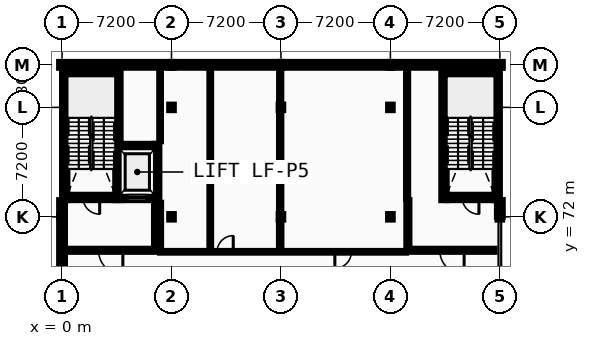
"""IFC4 building model, lengths in metres.
Left out: names, types, materials, properties, quantities, classifications, styles, units other than length and angle.
Written with IfcOpenShell. Run it as: python <this file> out.ifc"""

import sys

from ifc_helpers import new_model, si_unit, direction, frame, frame_2d, origin, origin_2d, place, context, subcontext, project, spatial, rectangle, i_section, extrude, element, fill, save


model = new_model("IFC4")
c1 = context("Model", 3, precision=1e-05, world=origin(), true_north=direction((0.0, 1.0)))
c2 = subcontext(c1, "Body", "Model", "MODEL_VIEW")
j1 = project(units=[si_unit("LENGTHUNIT", "METRE"), si_unit("PLANEANGLEUNIT", "RADIAN")], contexts=[c1])
p1 = place(None, origin())
s1 = spatial("IfcSite", under=j1, at=p1, CompositionType="ELEMENT")
p2 = place(p1, origin())
s2 = spatial("IfcBuilding", under=s1, at=p2, CompositionType="ELEMENT")
p3 = place(p2, frame((0.0, 0.0, 5.2)))
s3 = spatial("IfcBuildingStorey", under=s2, at=p3, CompositionType="ELEMENT", Elevation=5.2)
for number, where, z_axis, x_axis in (
    (1, (0.0, 72.0, 0.0), (0.0, 0.0, 1.0), (1.0, 0.0, 0.0)),
    (2, (0.0, 82.0, 0.0), (0.0, 0.0, 1.0), (1.0, 0.0, 0.0)),
    (3, (7.2, 72.0, 0.0), (0.0, 0.0, 1.0), (1.0, 0.0, 0.0)),
    (4, (7.2, 79.2, 0.0), (0.0, 0.0, 1.0), (1.0, 0.0, 0.0)),
    (5, (7.2, 82.0, 0.0), (0.0, 0.0, 1.0), (1.0, 0.0, 0.0)),
    (6, (14.4, 72.0, 0.0), (0.0, 0.0, 1.0), (1.0, 0.0, 0.0)),
    (7, (14.4, 79.2, 0.0), (0.0, 0.0, 1.0), (1.0, 0.0, 0.0)),
    (8, (14.4, 82.0, 0.0), (0.0, 0.0, 1.0), (1.0, 0.0, 0.0)),
    (9, (21.6, 72.0, 0.0), (0.0, 0.0, 1.0), (1.0, 0.0, 0.0)),
    (10, (21.6, 79.2, 0.0), (0.0, 0.0, 1.0), (1.0, 0.0, 0.0)),
    (11, (21.6, 82.0, 0.0), (0.0, 0.0, 1.0), (1.0, 0.0, 0.0)),
    (12, (28.8, 72.0, 0.0), (0.0, 0.0, 1.0), (1.0, 0.0, 0.0)),
    (13, (28.8, 82.0, 0.0), (0.0, 0.0, 1.0), (1.0, 0.0, 0.0)),
):
    element("IfcColumn", number, at=place(p3, frame(where, z_axis=z_axis, x_axis=x_axis)), inside=s3, PredefinedType="COLUMN", context=c2, shape_type="SweptSolid", body=[
        extrude(i_section(OverallWidth=0.3, OverallDepth=0.36, WebThickness=0.012, FlangeThickness=0.022, FilletRadius=0.027, at=origin_2d()), origin(), (0.0, 0.0, 1.0), 4.4),
    ])
p4 = place(p3, frame((7.2, 82.0, 0.0), z_axis=(0.0, 0.0, 1.0), x_axis=(-1.0, 0.0, 0.0)))
e14 = element("IfcWall", 14, at=p4, inside=s3, PredefinedType="STANDARD", context=c2, shape_type="SweptSolid", body=[
    extrude(rectangle(XDim=7.39, YDim=0.38, at=frame_2d((3.695, 0.0))), origin(), (0.0, 0.0, 1.0), 3.88),
])
p5 = place(p3, frame((14.4, 82.0, 0.0), z_axis=(0.0, 0.0, 1.0), x_axis=(-1.0, 0.0, 0.0)))
e15 = element("IfcWall", 15, at=p5, inside=s3, PredefinedType="STANDARD", context=c2, shape_type="SweptSolid", body=[
    extrude(rectangle(XDim=7.2, YDim=0.38, at=frame_2d((3.6, 0.0))), origin(), (0.0, 0.0, 1.0), 3.88),
])
p6 = place(p5, frame((1.36, 0.0, 1.2)))
e16 = element("IfcOpeningElement", 16, at=p6, cuts=e15, PredefinedType="OPENING", context=c2, shape_type="SweptSolid", body=[
    extrude(rectangle(XDim=1.6, YDim=1.4, at=frame_2d((0.8, 0.7))), frame((0.0, 0.2, 0.0), z_axis=(0.0, -1.0, 0.0), x_axis=(1.0, 0.0, 0.0)), (0.0, 0.0, 1.0), 0.4),
])
p7 = place(p3, frame((21.6, 82.0, 0.0), z_axis=(0.0, 0.0, 1.0), x_axis=(-1.0, 0.0, 0.0)))
e17 = element("IfcWall", 17, at=p7, inside=s3, PredefinedType="STANDARD", context=c2, shape_type="SweptSolid", body=[
    extrude(rectangle(XDim=7.2, YDim=0.38, at=frame_2d((3.6, 0.0))), origin(), (0.0, 0.0, 1.0), 3.88),
])
p8 = place(p7, frame((2.5, 0.0, 0.95)))
e18 = element("IfcOpeningElement", 18, at=p8, cuts=e17, PredefinedType="OPENING", context=c2, shape_type="SweptSolid", body=[
    extrude(rectangle(XDim=2.2, YDim=1.75, at=frame_2d((1.1, 0.875))), frame((0.0, 0.2, 0.0), z_axis=(0.0, -1.0, 0.0), x_axis=(1.0, 0.0, 0.0)), (0.0, 0.0, 1.0), 0.4),
])
p9 = place(p3, frame((28.99, 82.0, 0.0), z_axis=(0.0, 0.0, 1.0), x_axis=(-1.0, 0.0, 0.0)))
e19 = element("IfcWall", 19, at=p9, inside=s3, PredefinedType="STANDARD", context=c2, shape_type="SweptSolid", body=[
    extrude(rectangle(XDim=7.39, YDim=0.38, at=frame_2d((3.695, 0.0))), origin(), (0.0, 0.0, 1.0), 3.88),
])
p10 = place(p9, frame((1.787, 0.0, 0.95)))
e20 = element("IfcOpeningElement", 20, at=p10, cuts=e19, PredefinedType="OPENING", context=c2, shape_type="SweptSolid", body=[
    extrude(rectangle(XDim=0.86, YDim=1.26, at=frame_2d((0.43, 0.63))), frame((0.0, 0.2, 0.0), z_axis=(0.0, -1.0, 0.0), x_axis=(1.0, 0.0, 0.0)), (0.0, 0.0, 1.0), 0.4),
])
p11 = place(p9, frame((4.743, 0.0, 0.95)))
e21 = element("IfcOpeningElement", 21, at=p11, cuts=e19, PredefinedType="OPENING", context=c2, shape_type="SweptSolid", body=[
    extrude(rectangle(XDim=0.86, YDim=1.26, at=frame_2d((0.43, 0.63))), frame((0.0, 0.2, 0.0), z_axis=(0.0, -1.0, 0.0), x_axis=(1.0, 0.0, 0.0)), (0.0, 0.0, 1.0), 0.4),
])
p12 = place(p3, frame((0.0, 72.0, 0.0), z_axis=(0.0, 0.0, 1.0), x_axis=(0.0, -1.0, 0.0)))
e22 = element("IfcWall", 22, at=p12, inside=s3, PredefinedType="STANDARD", context=c2, shape_type="SweptSolid", body=[
    extrude(rectangle(XDim=7.2, YDim=0.38, at=frame_2d((3.6, 0.0))), origin(), (0.0, 0.0, 1.0), 3.81),
])
for number, where, z_axis, x_axis in (
    (23, (0.0, 73.1, 0.0), (0.0, 0.0, 1.0), (0.0, -1.0, 0.0)),
    (24, (28.8, 72.0, 0.0), (0.0, 0.0, 1.0), (0.0, 1.0, 0.0)),
):
    element("IfcWall", number, at=place(p3, frame(where, z_axis=z_axis, x_axis=x_axis)), inside=s3, PredefinedType="STANDARD", context=c2, shape_type="SweptSolid", body=[
        extrude(rectangle(XDim=1.1, YDim=0.38, at=frame_2d((0.55, 0.0))), origin(), (0.0, 0.0, 1.0), 4.185),
    ])
p13 = place(p3, frame((0.35, 73.275, 0.0), z_axis=(0.0, 0.0, 1.0), x_axis=(1.0, 0.0, 0.0)))
e25 = element("IfcWall", 25, at=p13, inside=s3, PredefinedType="SHEAR", context=c2, shape_type="SweptSolid", body=[
    extrude(rectangle(XDim=3.15, YDim=0.35, at=frame_2d((1.575, 0.0))), origin(), (0.0, 0.0, 1.0), 4.185),
])
p14 = place(p13, frame((1.025, 0.0, 0.0)))
e26 = element("IfcOpeningElement", 26, at=p14, cuts=e25, PredefinedType="OPENING", context=c2, shape_type="SweptSolid", body=[
    extrude(rectangle(XDim=1.1, YDim=2.15, at=frame_2d((0.55, 1.075))), frame((0.0, 0.185, 0.0), z_axis=(0.0, -1.0, 0.0), x_axis=(1.0, 0.0, 0.0)), (0.0, 0.0, 1.0), 0.37),
])
p15 = place(p3, frame((0.35, 81.425, 0.0), z_axis=(0.0, 0.0, 1.0), x_axis=(1.0, 0.0, 0.0)))
e27 = element("IfcWall", 27, at=p15, inside=s3, PredefinedType="SHEAR", context=c2, shape_type="SweptSolid", body=[
    extrude(rectangle(XDim=3.15, YDim=0.35, at=frame_2d((1.575, 0.0))), origin(), (0.0, 0.0, 1.0), 4.185),
])
for number, where, z_axis, x_axis in (
    (28, (0.175, 73.1, 0.0), (0.0, 0.0, 1.0), (0.0, 1.0, 0.0)),
    (29, (3.675, 73.1, 0.0), (0.0, 0.0, 1.0), (0.0, 1.0, 0.0)),
):
    element("IfcWall", number, at=place(p3, frame(where, z_axis=z_axis, x_axis=x_axis)), inside=s3, PredefinedType="SHEAR", context=c2, shape_type="SweptSolid", body=[
        extrude(rectangle(XDim=8.71, YDim=0.35, at=frame_2d((4.355, 0.0))), origin(), (0.0, 0.0, 1.0), 4.185),
    ])
p16 = place(p3, frame((3.85, 73.275, 0.0), z_axis=(0.0, 0.0, 1.0), x_axis=(1.0, 0.0, 0.0)))
e30 = element("IfcWall", 30, at=p16, inside=s3, PredefinedType="SHEAR", context=c2, shape_type="SweptSolid", body=[
    extrude(rectangle(XDim=2.2, YDim=0.35, at=frame_2d((1.1, 0.0))), origin(), (0.0, 0.0, 1.0), 4.185),
])
p17 = place(p16, frame((0.5, 0.0, 0.0)))
e31 = element("IfcOpeningElement", 31, at=p17, cuts=e30, PredefinedType="OPENING", context=c2, shape_type="SweptSolid", body=[
    extrude(rectangle(XDim=1.2, YDim=2.2, at=frame_2d((0.6, 1.1))), frame((0.0, 0.185, 0.0), z_axis=(0.0, -1.0, 0.0), x_axis=(1.0, 0.0, 0.0)), (0.0, 0.0, 1.0), 0.37),
])
p18 = place(p3, frame((3.85, 76.625, 0.0), z_axis=(0.0, 0.0, 1.0), x_axis=(1.0, 0.0, 0.0)))
e32 = element("IfcWall", 32, at=p18, inside=s3, PredefinedType="SHEAR", context=c2, shape_type="SweptSolid", body=[
    extrude(rectangle(XDim=2.2, YDim=0.35, at=frame_2d((1.1, 0.0))), origin(), (0.0, 0.0, 1.0), 4.185),
])
p19 = place(p3, frame((6.225, 73.1, 0.0), z_axis=(0.0, 0.0, 1.0), x_axis=(0.0, 1.0, 0.0)))
e33 = element("IfcWall", 33, at=p19, inside=s3, PredefinedType="SHEAR", context=c2, shape_type="SweptSolid", body=[
    extrude(rectangle(XDim=3.7, YDim=0.35, at=frame_2d((1.85, 0.0))), origin(), (0.0, 0.0, 1.0), 4.185),
])
p20 = place(p3, frame((0.35, 69.8, 0.0), z_axis=(0.0, 0.0, 1.0), x_axis=(1.0, 0.0, 0.0)))
e34 = element("IfcWall", 34, at=p20, inside=s3, PredefinedType="PARTITIONING", context=c2, shape_type="SweptSolid", body=[
    extrude(rectangle(XDim=5.7, YDim=0.2, at=frame_2d((2.85, 0.0))), origin(), (0.0, 0.0, 1.0), 4.185),
])
p21 = place(p20, frame((2.05, 0.0, 0.0)))
e35 = element("IfcOpeningElement", 35, at=p21, cuts=e34, PredefinedType="OPENING", context=c2, shape_type="SweptSolid", body=[
    extrude(rectangle(XDim=1.6, YDim=2.2, at=frame_2d((0.8, 1.1))), frame((0.0, 0.11, 0.0), z_axis=(0.0, -1.0, 0.0), x_axis=(1.0, 0.0, 0.0)), (0.0, 0.0, 1.0), 0.22),
])
p22 = place(p3, frame((6.15, 69.9, 0.0), z_axis=(0.0, 0.0, 1.0), x_axis=(0.0, 1.0, 0.0)))
e36 = element("IfcWall", 36, at=p22, inside=s3, PredefinedType="PARTITIONING", context=c2, shape_type="SweptSolid", body=[
    extrude(rectangle(XDim=3.2, YDim=0.2, at=frame_2d((1.6, 0.0))), origin(), (0.0, 0.0, 1.0), 4.185),
])
p23 = place(p3, frame((25.3, 73.275, 0.0), z_axis=(0.0, 0.0, 1.0), x_axis=(1.0, 0.0, 0.0)))
e37 = element("IfcWall", 37, at=p23, inside=s3, PredefinedType="SHEAR", context=c2, shape_type="SweptSolid", body=[
    extrude(rectangle(XDim=3.15, YDim=0.35, at=frame_2d((1.575, 0.0))), origin(), (0.0, 0.0, 1.0), 4.185),
])
p24 = place(p23, frame((1.025, 0.0, 0.0)))
e38 = element("IfcOpeningElement", 38, at=p24, cuts=e37, PredefinedType="OPENING", context=c2, shape_type="SweptSolid", body=[
    extrude(rectangle(XDim=1.1, YDim=2.15, at=frame_2d((0.55, 1.075))), frame((0.0, 0.185, 0.0), z_axis=(0.0, -1.0, 0.0), x_axis=(1.0, 0.0, 0.0)), (0.0, 0.0, 1.0), 0.37),
])
p25 = place(p3, frame((25.3, 81.425, 0.0), z_axis=(0.0, 0.0, 1.0), x_axis=(1.0, 0.0, 0.0)))
e39 = element("IfcWall", 39, at=p25, inside=s3, PredefinedType="SHEAR", context=c2, shape_type="SweptSolid", body=[
    extrude(rectangle(XDim=3.15, YDim=0.35, at=frame_2d((1.575, 0.0))), origin(), (0.0, 0.0, 1.0), 4.185),
])
for number, where, z_axis, x_axis in (
    (40, (25.125, 73.1, 0.0), (0.0, 0.0, 1.0), (0.0, 1.0, 0.0)),
    (41, (28.625, 73.1, 0.0), (0.0, 0.0, 1.0), (0.0, 1.0, 0.0)),
):
    element("IfcWall", number, at=place(p3, frame(where, z_axis=z_axis, x_axis=x_axis)), inside=s3, PredefinedType="SHEAR", context=c2, shape_type="SweptSolid", body=[
        extrude(rectangle(XDim=8.71, YDim=0.35, at=frame_2d((4.355, 0.0))), origin(), (0.0, 0.0, 1.0), 4.185),
    ])
p26 = place(p3, frame((22.85, 69.8, 0.0), z_axis=(0.0, 0.0, 1.0), x_axis=(1.0, 0.0, 0.0)))
e42 = element("IfcWall", 42, at=p26, inside=s3, PredefinedType="PARTITIONING", context=c2, shape_type="SweptSolid", body=[
    extrude(rectangle(XDim=5.6, YDim=0.2, at=frame_2d((2.8, 0.0))), origin(), (0.0, 0.0, 1.0), 4.185),
])
p27 = place(p26, frame((2.0, 0.0, 0.0)))
e43 = element("IfcOpeningElement", 43, at=p27, cuts=e42, PredefinedType="OPENING", context=c2, shape_type="SweptSolid", body=[
    extrude(rectangle(XDim=1.6, YDim=2.2, at=frame_2d((0.8, 1.1))), frame((0.0, 0.11, 0.0), z_axis=(0.0, -1.0, 0.0), x_axis=(1.0, 0.0, 0.0)), (0.0, 0.0, 1.0), 0.22),
])
p28 = place(p3, frame((22.75, 69.9, 0.0), z_axis=(0.0, 0.0, 1.0), x_axis=(0.0, 1.0, 0.0)))
e44 = element("IfcWall", 44, at=p28, inside=s3, PredefinedType="PARTITIONING", context=c2, shape_type="SweptSolid", body=[
    extrude(rectangle(XDim=3.2, YDim=0.2, at=frame_2d((1.6, 0.0))), origin(), (0.0, 0.0, 1.0), 4.185),
])
p29 = place(p3, frame((6.45, 69.7, 0.0), z_axis=(0.0, 0.0, 1.0), x_axis=(1.0, 0.0, 0.0)))
e45 = element("IfcWall", 45, at=p29, inside=s3, PredefinedType="PARTITIONING", context=c2, shape_type="SweptSolid", body=[
    extrude(rectangle(XDim=16.18, YDim=0.11, at=frame_2d((8.09, 0.0))), origin(), (0.0, 0.0, 1.0), 4.185),
])
p30 = place(p29, frame((1.85, 0.0, 0.0)))
e46 = element("IfcOpeningElement", 46, at=p30, cuts=e45, PredefinedType="OPENING", context=c2, shape_type="SweptSolid", body=[
    extrude(rectangle(XDim=1.0, YDim=2.1, at=frame_2d((0.5, 1.05))), frame((0.0, 0.065, 0.0), z_axis=(0.0, -1.0, 0.0), x_axis=(1.0, 0.0, 0.0)), (0.0, 0.0, 1.0), 0.13),
])
p31 = place(p29, frame((3.75, 0.0, 0.0)))
e47 = element("IfcOpeningElement", 47, at=p31, cuts=e45, PredefinedType="OPENING", context=c2, shape_type="SweptSolid", body=[
    extrude(rectangle(XDim=1.062, YDim=2.124, at=frame_2d((0.531, 1.062))), frame((0.0, 0.065, 0.0), z_axis=(0.0, -1.0, 0.0), x_axis=(1.0, 0.0, 0.0)), (0.0, 0.0, 1.0), 0.13),
])
p32 = place(p29, frame((11.496, 0.0, 0.0)))
e48 = element("IfcOpeningElement", 48, at=p32, cuts=e45, PredefinedType="OPENING", context=c2, shape_type="SweptSolid", body=[
    extrude(rectangle(XDim=1.088, YDim=2.124, at=frame_2d((0.544, 1.062))), frame((0.0, 0.065, 0.0), z_axis=(0.0, -1.0, 0.0), x_axis=(1.0, 0.0, 0.0)), (0.0, 0.0, 1.0), 0.13),
])
p33 = place(p3, frame((6.45, 69.755, 0.0), z_axis=(0.0, 0.0, 1.0), x_axis=(0.0, 1.0, 0.0)))
e49 = element("IfcWall", 49, at=p33, inside=s3, PredefinedType="PARTITIONING", context=c2, shape_type="SweptSolid", body=[
    extrude(rectangle(XDim=3.17, YDim=0.125, at=frame_2d((1.585, 0.0))), origin(), (0.0, 0.0, 1.0), 4.185),
])
p34 = place(p3, frame((6.45, 76.975, 0.0), z_axis=(0.0, 0.0, 1.0), x_axis=(0.0, 1.0, 0.0)))
e50 = element("IfcWall", 50, at=p34, inside=s3, PredefinedType="PARTITIONING", context=c2, shape_type="SweptSolid", body=[
    extrude(rectangle(XDim=4.825, YDim=0.11, at=frame_2d((2.413, 0.0))), origin(), (0.0, 0.0, 1.0), 4.185),
])
p35 = place(p3, frame((9.75, 69.755, 0.0), z_axis=(0.0, 0.0, 1.0), x_axis=(0.0, 1.0, 0.0)))
e51 = element("IfcWall", 51, at=p35, inside=s3, PredefinedType="PARTITIONING", context=c2, shape_type="SweptSolid", body=[
    extrude(rectangle(XDim=12.045, YDim=0.11, at=frame_2d((6.022, 0.0))), origin(), (0.0, 0.0, 1.0), 3.9),
])
p36 = place(p3, frame((14.35, 69.755, 0.0), z_axis=(0.0, 0.0, 1.0), x_axis=(0.0, 1.0, 0.0)))
e52 = element("IfcWall", 52, at=p36, inside=s3, PredefinedType="PARTITIONING", context=c2, shape_type="SweptSolid", body=[
    extrude(rectangle(XDim=1.865, YDim=0.16, at=frame_2d((0.933, 0.0))), origin(), (0.0, 0.0, 1.0), 3.88),
])
p37 = place(p3, frame((14.35, 72.38, 0.0), z_axis=(0.0, 0.0, 1.0), x_axis=(0.0, 1.0, 0.0)))
e53 = element("IfcWall", 53, at=p37, inside=s3, PredefinedType="PARTITIONING", context=c2, shape_type="SweptSolid", body=[
    extrude(rectangle(XDim=6.44, YDim=0.15, at=frame_2d((3.22, 0.0))), origin(), (0.0, 0.0, 1.0), 3.88),
])
p38 = place(p3, frame((14.35, 79.58, 0.0), z_axis=(0.0, 0.0, 1.0), x_axis=(0.0, 1.0, 0.0)))
e54 = element("IfcWall", 54, at=p38, inside=s3, PredefinedType="PARTITIONING", context=c2, shape_type="SweptSolid", body=[
    extrude(rectangle(XDim=2.04, YDim=0.142, at=frame_2d((1.02, 0.0))), origin(), (0.0, 0.0, 1.0), 3.88),
])
p39 = place(p3, frame((22.7, 73.2, 0.0), z_axis=(0.0, 0.0, 1.0), x_axis=(0.0, 1.0, 0.0)))
e55 = element("IfcWall", 55, at=p39, inside=s3, PredefinedType="PARTITIONING", context=c2, shape_type="SweptSolid", body=[
    extrude(rectangle(XDim=8.6, YDim=0.135, at=frame_2d((4.3, 0.0))), origin(), (0.0, 0.0, 1.0), 4.185),
])
p40 = place(p6, origin())
e56 = element("IfcWindow", 56, at=p40, inside=s3, PartitioningType="SINGLE_PANEL", PredefinedType="WINDOW", context=c2, shape_type="SweptSolid", body=[
    extrude(rectangle(XDim=1.6, YDim=1.4, at=frame_2d((0.8, 0.7))), frame((0.0, 0.03, 0.0), z_axis=(0.0, -1.0, 0.0), x_axis=(1.0, 0.0, 0.0)), (0.0, 0.0, 1.0), 0.06),
])
fill(e16, e56)
p41 = place(p8, origin())
e57 = element("IfcWindow", 57, at=p41, inside=s3, PartitioningType="SINGLE_PANEL", PredefinedType="WINDOW", context=c2, shape_type="SweptSolid", body=[
    extrude(rectangle(XDim=2.2, YDim=1.75, at=frame_2d((1.1, 0.875))), frame((0.0, 0.03, 0.0), z_axis=(0.0, -1.0, 0.0), x_axis=(1.0, 0.0, 0.0)), (0.0, 0.0, 1.0), 0.06),
])
fill(e18, e57)
p42 = place(p10, origin())
e58 = element("IfcWindow", 58, at=p42, inside=s3, PartitioningType="SINGLE_PANEL", PredefinedType="WINDOW", context=c2, shape_type="SweptSolid", body=[
    extrude(rectangle(XDim=0.86, YDim=1.26, at=frame_2d((0.43, 0.63))), frame((0.0, 0.03, 0.0), z_axis=(0.0, -1.0, 0.0), x_axis=(1.0, 0.0, 0.0)), (0.0, 0.0, 1.0), 0.06),
])
fill(e20, e58)
p43 = place(p11, origin())
e59 = element("IfcWindow", 59, at=p43, inside=s3, PartitioningType="SINGLE_PANEL", PredefinedType="WINDOW", context=c2, shape_type="SweptSolid", body=[
    extrude(rectangle(XDim=0.86, YDim=1.26, at=frame_2d((0.43, 0.63))), frame((0.0, 0.03, 0.0), z_axis=(0.0, -1.0, 0.0), x_axis=(1.0, 0.0, 0.0)), (0.0, 0.0, 1.0), 0.06),
])
fill(e21, e59)
p44 = place(p14, origin())
e60 = element("IfcDoor", 60, at=p44, inside=s3, OperationType="SINGLE_SWING_RIGHT", PredefinedType="DOOR", context=c2, shape_type="SweptSolid", body=[
    extrude(rectangle(XDim=1.1, YDim=2.15, at=frame_2d((0.55, 1.075))), frame((0.0, 0.025, 0.0), z_axis=(0.0, -1.0, 0.0), x_axis=(1.0, 0.0, 0.0)), (0.0, 0.0, 1.0), 0.05),
])
fill(e26, e60)
p45 = place(p17, origin())
e61 = element("IfcDoor", 61, at=p45, inside=s3, OperationType="SLIDING_TO_RIGHT", PredefinedType="DOOR", context=c2, shape_type="SweptSolid", body=[
    extrude(rectangle(XDim=1.2, YDim=2.2, at=frame_2d((0.6, 1.1))), frame((0.0, 0.025, 0.0), z_axis=(0.0, -1.0, 0.0), x_axis=(1.0, 0.0, 0.0)), (0.0, 0.0, 1.0), 0.05),
])
fill(e31, e61)
p46 = place(p21, origin())
e62 = element("IfcDoor", 62, at=p46, inside=s3, OperationType="DOUBLE_DOOR_SINGLE_SWING", PredefinedType="DOOR", context=c2, shape_type="SweptSolid", body=[
    extrude(rectangle(XDim=1.6, YDim=2.2, at=frame_2d((0.8, 1.1))), frame((0.0, 0.025, 0.0), z_axis=(0.0, -1.0, 0.0), x_axis=(1.0, 0.0, 0.0)), (0.0, 0.0, 1.0), 0.05),
])
fill(e35, e62)
p47 = place(p24, origin())
e63 = element("IfcDoor", 63, at=p47, inside=s3, OperationType="SINGLE_SWING_RIGHT", PredefinedType="DOOR", context=c2, shape_type="SweptSolid", body=[
    extrude(rectangle(XDim=1.1, YDim=2.15, at=frame_2d((0.55, 1.075))), frame((0.0, 0.025, 0.0), z_axis=(0.0, -1.0, 0.0), x_axis=(1.0, 0.0, 0.0)), (0.0, 0.0, 1.0), 0.05),
])
fill(e38, e63)
p48 = place(p27, origin())
e64 = element("IfcDoor", 64, at=p48, inside=s3, OperationType="DOUBLE_DOOR_SINGLE_SWING", PredefinedType="DOOR", context=c2, shape_type="SweptSolid", body=[
    extrude(rectangle(XDim=1.6, YDim=2.2, at=frame_2d((0.8, 1.1))), frame((0.0, 0.025, 0.0), z_axis=(0.0, -1.0, 0.0), x_axis=(1.0, 0.0, 0.0)), (0.0, 0.0, 1.0), 0.05),
])
fill(e43, e64)
p49 = place(p30, frame((1.0, 0.0, 0.0), z_axis=(0.0, 0.0, 1.0), x_axis=(-1.0, 0.0, 0.0)))
e65 = element("IfcDoor", 65, at=p49, inside=s3, OperationType="SLIDING_TO_LEFT", PredefinedType="DOOR", context=c2, shape_type="SweptSolid", body=[
    extrude(rectangle(XDim=1.0, YDim=2.1, at=frame_2d((0.5, 1.05))), frame((0.0, 0.025, 0.0), z_axis=(0.0, -1.0, 0.0), x_axis=(1.0, 0.0, 0.0)), (0.0, 0.0, 1.0), 0.05),
])
fill(e46, e65)
p50 = place(p31, frame((1.062, 0.0, 0.0), z_axis=(0.0, 0.0, 1.0), x_axis=(-1.0, 0.0, 0.0)))
e66 = element("IfcDoor", 66, at=p50, inside=s3, OperationType="SINGLE_SWING_RIGHT", PredefinedType="DOOR", context=c2, shape_type="SweptSolid", body=[
    extrude(rectangle(XDim=1.062, YDim=2.124, at=frame_2d((0.531, 1.062))), frame((0.0, 0.025, 0.0), z_axis=(0.0, -1.0, 0.0), x_axis=(1.0, 0.0, 0.0)), (0.0, 0.0, 1.0), 0.05),
])
fill(e47, e66)
p51 = place(p32, frame((1.088, 0.0, 0.0), z_axis=(0.0, 0.0, 1.0), x_axis=(-1.0, 0.0, 0.0)))
e67 = element("IfcDoor", 67, at=p51, inside=s3, OperationType="SINGLE_SWING_LEFT", PredefinedType="DOOR", context=c2, shape_type="SweptSolid", body=[
    extrude(rectangle(XDim=1.088, YDim=2.124, at=frame_2d((0.544, 1.062))), frame((0.0, 0.025, 0.0), z_axis=(0.0, -1.0, 0.0), x_axis=(1.0, 0.0, 0.0)), (0.0, 0.0, 1.0), 0.05),
])
fill(e48, e67)
save(model, sys.argv[1])
